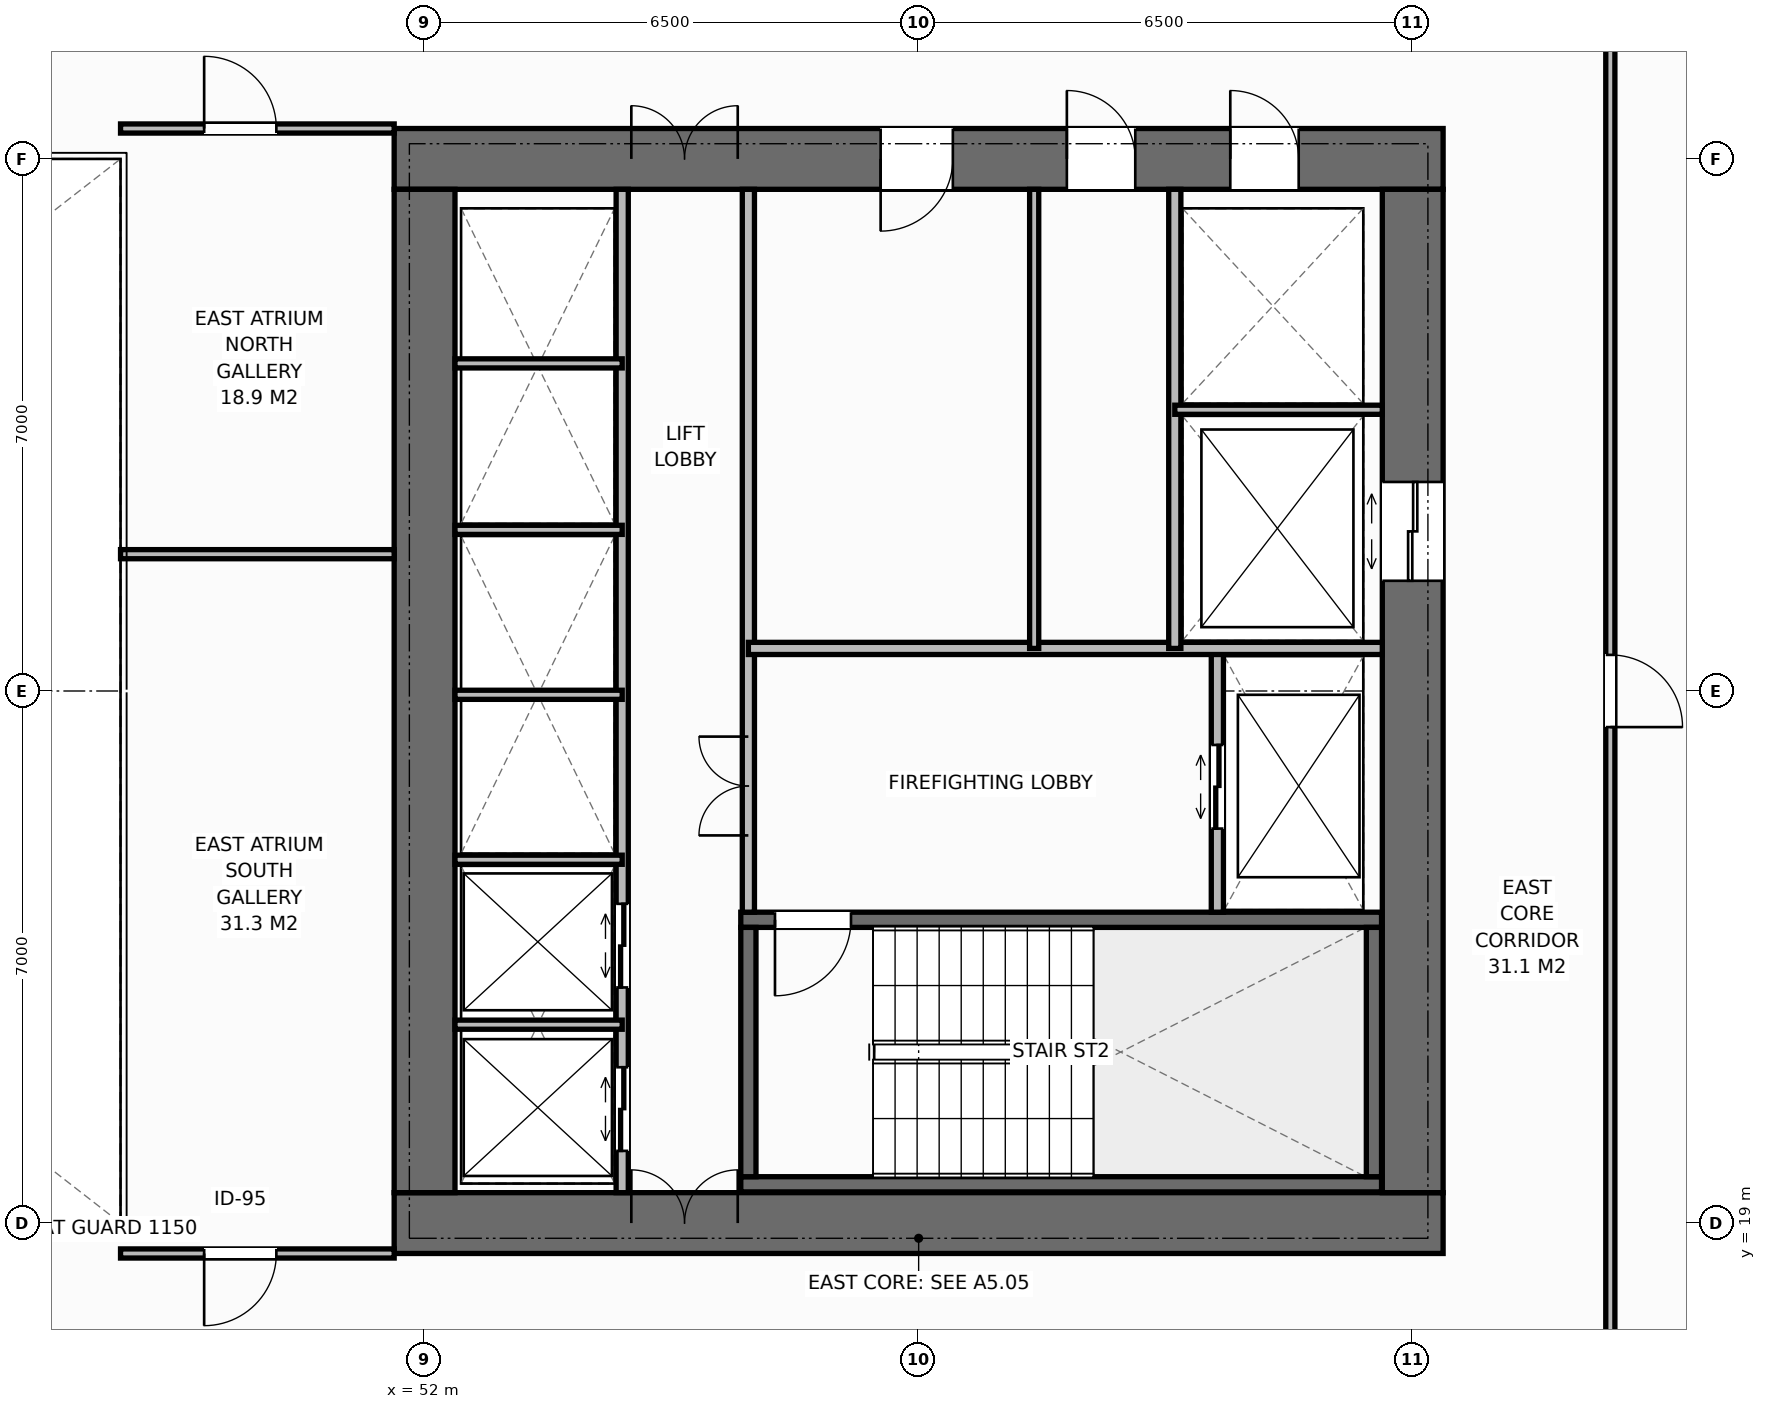
"""IFC4 building model, lengths in metres.
Left out: names, types, materials, properties, quantities, classifications, styles, units other than length and angle.
Written with IfcOpenShell. Run it as: python <this file> out.ifc"""

import sys

from ifc_helpers import new_model, si_unit, direction, frame, frame_2d, origin, place, context, subcontext, project, spatial, rectangle, extrude, element, fill, save


model = new_model("IFC4")
c1 = context("Model", 3, precision=1e-05, world=origin(), true_north=direction((0.0, 1.0)))
c2 = subcontext(c1, "Body", "Model", "MODEL_VIEW")
j1 = project(units=[si_unit("LENGTHUNIT", "METRE"), si_unit("PLANEANGLEUNIT", "RADIAN")], contexts=[c1])
p1 = place(None, origin())
s1 = spatial("IfcSite", under=j1, at=p1, CompositionType="ELEMENT")
p2 = place(p1, origin())
s2 = spatial("IfcBuilding", under=s1, at=p2, CompositionType="ELEMENT")
p3 = place(p2, frame((0.0, 0.0, 58.2)))
s3 = spatial("IfcBuildingStorey", under=s2, at=p3, CompositionType="ELEMENT", Elevation=58.2)
p4 = place(p3, frame((51.6, 19.0, 0.0), z_axis=(0.0, 0.0, 1.0), x_axis=(1.0, 0.0, 0.0)))
e1 = element("IfcWall", 1, at=p4, inside=s3, PredefinedType="SHEAR", context=c2, shape_type="SweptSolid", body=[
    extrude(rectangle(XDim=13.8, YDim=0.8, at=frame_2d((6.9, 0.0))), origin(), (0.0, 0.0, 1.0), 3.8),
])
p5 = place(p4, frame((3.12, 0.0, 0.0)))
e2 = element("IfcOpeningElement", 2, at=p5, cuts=e1, PredefinedType="OPENING", context=c2, shape_type="SweptSolid", body=[
    extrude(rectangle(XDim=1.4, YDim=2.2, at=frame_2d((0.7, 1.1))), frame((0.0, 0.41, 0.0), z_axis=(0.0, -1.0, 0.0), x_axis=(1.0, 0.0, 0.0)), (0.0, 0.0, 1.0), 0.82),
])
p6 = place(p3, frame((51.6, 33.0, 0.0), z_axis=(0.0, 0.0, 1.0), x_axis=(1.0, 0.0, 0.0)))
e3 = element("IfcWall", 3, at=p6, inside=s3, PredefinedType="SHEAR", context=c2, shape_type="SweptSolid", body=[
    extrude(rectangle(XDim=13.8, YDim=0.8, at=frame_2d((6.9, 0.0))), origin(), (0.0, 0.0, 1.0), 3.8),
])
p7 = place(p6, frame((3.12, 0.0, 0.0)))
e4 = element("IfcOpeningElement", 4, at=p7, cuts=e3, PredefinedType="OPENING", context=c2, shape_type="SweptSolid", body=[
    extrude(rectangle(XDim=1.4, YDim=2.2, at=frame_2d((0.7, 1.1))), frame((0.0, 0.41, 0.0), z_axis=(0.0, -1.0, 0.0), x_axis=(1.0, 0.0, 0.0)), (0.0, 0.0, 1.0), 0.82),
])
p8 = place(p6, frame((11.0, 0.0, 0.0)))
e5 = element("IfcOpeningElement", 5, at=p8, cuts=e3, PredefinedType="OPENING", context=c2, shape_type="SweptSolid", body=[
    extrude(rectangle(XDim=0.9, YDim=2.15, at=frame_2d((0.45, 1.075))), frame((0.0, 0.41, 0.0), z_axis=(0.0, -1.0, 0.0), x_axis=(1.0, 0.0, 0.0)), (0.0, 0.0, 1.0), 0.82),
])
p9 = place(p6, frame((6.4, 0.0, 0.0)))
e6 = element("IfcOpeningElement", 6, at=p9, cuts=e3, PredefinedType="OPENING", context=c2, shape_type="SweptSolid", body=[
    extrude(rectangle(XDim=0.95, YDim=2.15, at=frame_2d((0.475, 1.075))), frame((0.0, 0.41, 0.0), z_axis=(0.0, -1.0, 0.0), x_axis=(1.0, 0.0, 0.0)), (0.0, 0.0, 1.0), 0.82),
])
p10 = place(p6, frame((8.85, 0.0, 0.0)))
e7 = element("IfcOpeningElement", 7, at=p10, cuts=e3, PredefinedType="OPENING", context=c2, shape_type="SweptSolid", body=[
    extrude(rectangle(XDim=0.9, YDim=2.15, at=frame_2d((0.45, 1.075))), frame((0.0, 0.41, 0.0), z_axis=(0.0, -1.0, 0.0), x_axis=(1.0, 0.0, 0.0)), (0.0, 0.0, 1.0), 0.82),
])
p11 = place(p3, frame((52.0, 19.4, 0.0), z_axis=(0.0, 0.0, 1.0), x_axis=(0.0, 1.0, 0.0)))
e8 = element("IfcWall", 8, at=p11, inside=s3, PredefinedType="SHEAR", context=c2, shape_type="SweptSolid", body=[
    extrude(rectangle(XDim=13.2, YDim=0.8, at=frame_2d((6.6, 0.0))), origin(), (0.0, 0.0, 1.0), 3.8),
])
p12 = place(p3, frame((65.0, 19.4, 0.0), z_axis=(0.0, 0.0, 1.0), x_axis=(0.0, 1.0, 0.0)))
e9 = element("IfcWall", 9, at=p12, inside=s3, PredefinedType="SHEAR", context=c2, shape_type="SweptSolid", body=[
    extrude(rectangle(XDim=13.2, YDim=0.8, at=frame_2d((6.6, 0.0))), origin(), (0.0, 0.0, 1.0), 3.8),
])
p13 = place(p12, frame((8.05, 0.0, 0.0)))
e10 = element("IfcOpeningElement", 10, at=p13, cuts=e9, PredefinedType="OPENING", context=c2, shape_type="SweptSolid", body=[
    extrude(rectangle(XDim=1.3, YDim=2.2, at=frame_2d((0.65, 1.1))), frame((0.0, 0.41, 0.0), z_axis=(0.0, -1.0, 0.0), x_axis=(1.0, 0.0, 0.0)), (0.0, 0.0, 1.0), 0.82),
])
p14 = place(p3, frame((56.16, 19.51, 0.0), z_axis=(0.0, 0.0, 1.0), x_axis=(1.0, 0.0, 0.0)))
e11 = element("IfcWall", 11, at=p14, inside=s3, PredefinedType="SHEAR", context=c2, shape_type="SweptSolid", body=[
    extrude(rectangle(XDim=8.43, YDim=0.2, at=frame_2d((4.215, 0.0))), origin(), (0.0, 0.0, 1.0), 3.8),
])
p15 = place(p3, frame((56.16, 22.99, 0.0), z_axis=(0.0, 0.0, 1.0), x_axis=(1.0, 0.0, 0.0)))
e12 = element("IfcWall", 12, at=p15, inside=s3, PredefinedType="SHEAR", context=c2, shape_type="SweptSolid", body=[
    extrude(rectangle(XDim=8.43, YDim=0.2, at=frame_2d((4.215, 0.0))), origin(), (0.0, 0.0, 1.0), 3.8),
])
p16 = place(p15, frame((0.45, 0.0, 0.0)))
e13 = element("IfcOpeningElement", 13, at=p16, cuts=e12, PredefinedType="OPENING", context=c2, shape_type="SweptSolid", body=[
    extrude(rectangle(XDim=1.0, YDim=2.15, at=frame_2d((0.5, 1.075))), frame((0.0, 0.11, 0.0), z_axis=(0.0, -1.0, 0.0), x_axis=(1.0, 0.0, 0.0)), (0.0, 0.0, 1.0), 0.22),
])
for number, where, z_axis, x_axis in (
    (14, (56.26, 19.61, 0.0), (0.0, 0.0, 1.0), (0.0, 1.0, 0.0)),
    (15, (64.49, 19.61, 0.0), (0.0, 0.0, 1.0), (0.0, 1.0, 0.0)),
):
    element("IfcWall", number, at=place(p3, frame(where, z_axis=z_axis, x_axis=x_axis)), inside=s3, PredefinedType="SHEAR", context=c2, shape_type="SweptSolid", body=[
        extrude(rectangle(XDim=3.28, YDim=0.2, at=frame_2d((1.64, 0.0))), origin(), (0.0, 0.0, 1.0), 3.8),
    ])
p17 = place(p3, frame((54.6, 19.4, 0.0), z_axis=(0.0, 0.0, 1.0), x_axis=(0.0, 1.0, 0.0)))
e16 = element("IfcWall", 16, at=p17, inside=s3, PredefinedType="STANDARD", context=c2, shape_type="SweptSolid", body=[
    extrude(rectangle(XDim=13.2, YDim=0.16, at=frame_2d((6.6, 0.0))), origin(), (0.0, 0.0, 1.0), 3.55),
])
p18 = place(p17, frame((0.55, 0.0, 0.0)))
e17 = element("IfcOpeningElement", 17, at=p18, cuts=e16, PredefinedType="OPENING", context=c2, shape_type="SweptSolid", body=[
    extrude(rectangle(XDim=1.1, YDim=2.2, at=frame_2d((0.55, 1.1))), frame((0.0, 0.09, 0.0), z_axis=(0.0, -1.0, 0.0), x_axis=(1.0, 0.0, 0.0)), (0.0, 0.0, 1.0), 0.18),
])
p19 = place(p17, frame((2.7, 0.0, 0.0)))
e18 = element("IfcOpeningElement", 18, at=p19, cuts=e16, PredefinedType="OPENING", context=c2, shape_type="SweptSolid", body=[
    extrude(rectangle(XDim=1.1, YDim=2.2, at=frame_2d((0.55, 1.1))), frame((0.0, 0.09, 0.0), z_axis=(0.0, -1.0, 0.0), x_axis=(1.0, 0.0, 0.0)), (0.0, 0.0, 1.0), 0.18),
])
p20 = place(p3, frame((56.26, 23.09, 0.0), z_axis=(0.0, 0.0, 1.0), x_axis=(0.0, 1.0, 0.0)))
e19 = element("IfcWall", 19, at=p20, inside=s3, PredefinedType="STANDARD", context=c2, shape_type="SweptSolid", body=[
    extrude(rectangle(XDim=9.51, YDim=0.16, at=frame_2d((4.755, 0.0))), origin(), (0.0, 0.0, 1.0), 3.55),
])
p21 = place(p20, frame((1.01, 0.0, 0.0)))
e20 = element("IfcOpeningElement", 20, at=p21, cuts=e19, PredefinedType="OPENING", context=c2, shape_type="SweptSolid", body=[
    extrude(rectangle(XDim=1.3, YDim=2.2, at=frame_2d((0.65, 1.1))), frame((0.0, 0.09, 0.0), z_axis=(0.0, -1.0, 0.0), x_axis=(1.0, 0.0, 0.0)), (0.0, 0.0, 1.0), 0.18),
])
for number, where, z_axis, x_axis in (
    (21, (52.4, 21.61, 0.0), (0.0, 0.0, 1.0), (1.0, 0.0, 0.0)),
    (22, (52.4, 23.78, 0.0), (0.0, 0.0, 1.0), (1.0, 0.0, 0.0)),
    (23, (52.4, 25.95, 0.0), (0.0, 0.0, 1.0), (1.0, 0.0, 0.0)),
    (24, (52.4, 28.12, 0.0), (0.0, 0.0, 1.0), (1.0, 0.0, 0.0)),
    (25, (52.4, 30.31, 0.0), (0.0, 0.0, 1.0), (1.0, 0.0, 0.0)),
):
    element("IfcWall", number, at=place(p3, frame(where, z_axis=z_axis, x_axis=x_axis)), inside=s3, PredefinedType="PARTITIONING", context=c2, shape_type="SweptSolid", body=[
        extrude(rectangle(XDim=2.2, YDim=0.12, at=frame_2d((1.1, 0.0))), origin(), (0.0, 0.0, 1.0), 3.55),
    ])
p22 = place(p3, frame((62.43, 23.09, 0.0), z_axis=(0.0, 0.0, 1.0), x_axis=(0.0, 1.0, 0.0)))
e26 = element("IfcWall", 26, at=p22, inside=s3, PredefinedType="STANDARD", context=c2, shape_type="SweptSolid", body=[
    extrude(rectangle(XDim=3.47, YDim=0.16, at=frame_2d((1.735, 0.0))), origin(), (0.0, 0.0, 1.0), 3.55),
])
p23 = place(p22, frame((1.1, 0.0, 0.0)))
e27 = element("IfcOpeningElement", 27, at=p23, cuts=e26, PredefinedType="OPENING", context=c2, shape_type="SweptSolid", body=[
    extrude(rectangle(XDim=1.1, YDim=2.2, at=frame_2d((0.55, 1.1))), frame((0.0, 0.09, 0.0), z_axis=(0.0, -1.0, 0.0), x_axis=(1.0, 0.0, 0.0)), (0.0, 0.0, 1.0), 0.18),
])
p24 = place(p3, frame((56.26, 26.56, 0.0), z_axis=(0.0, 0.0, 1.0), x_axis=(1.0, 0.0, 0.0)))
e28 = element("IfcWall", 28, at=p24, inside=s3, PredefinedType="STANDARD", context=c2, shape_type="SweptSolid", body=[
    extrude(rectangle(XDim=8.34, YDim=0.16, at=frame_2d((4.17, 0.0))), origin(), (0.0, 0.0, 1.0), 3.55),
])
p25 = place(p3, frame((61.87, 26.56, 0.0), z_axis=(0.0, 0.0, 1.0), x_axis=(0.0, 1.0, 0.0)))
e29 = element("IfcWall", 29, at=p25, inside=s3, PredefinedType="STANDARD", context=c2, shape_type="SweptSolid", body=[
    extrude(rectangle(XDim=6.04, YDim=0.16, at=frame_2d((3.02, 0.0))), origin(), (0.0, 0.0, 1.0), 3.55),
])
p26 = place(p3, frame((61.87, 29.7, 0.0), z_axis=(0.0, 0.0, 1.0), x_axis=(1.0, 0.0, 0.0)))
e30 = element("IfcWall", 30, at=p26, inside=s3, PredefinedType="PARTITIONING", context=c2, shape_type="SweptSolid", body=[
    extrude(rectangle(XDim=2.73, YDim=0.12, at=frame_2d((1.365, 0.0))), origin(), (0.0, 0.0, 1.0), 3.55),
])
p27 = place(p3, frame((60.02, 26.56, 0.0), z_axis=(0.0, 0.0, 1.0), x_axis=(0.0, 1.0, 0.0)))
e31 = element("IfcWall", 31, at=p27, inside=s3, PredefinedType="PARTITIONING", context=c2, shape_type="SweptSolid", body=[
    extrude(rectangle(XDim=6.04, YDim=0.12, at=frame_2d((3.02, 0.0))), origin(), (0.0, 0.0, 1.0), 3.55),
])
p28 = place(p3, frame((48.0, 27.8, 0.0), z_axis=(0.0, 0.0, 1.0), x_axis=(1.0, 0.0, 0.0)))
e32 = element("IfcWall", 32, at=p28, inside=s3, PredefinedType="PARTITIONING", context=c2, shape_type="SweptSolid", body=[
    extrude(rectangle(XDim=3.6, YDim=0.12, at=frame_2d((1.8, 0.0))), origin(), (0.0, 0.0, 1.0), 3.55),
])
p29 = place(p3, frame((48.0, 18.6, 0.0), z_axis=(0.0, 0.0, 1.0), x_axis=(1.0, 0.0, 0.0)))
e33 = element("IfcWall", 33, at=p29, inside=s3, PredefinedType="PARTITIONING", context=c2, shape_type="SweptSolid", body=[
    extrude(rectangle(XDim=3.6, YDim=0.12, at=frame_2d((1.8, 0.0))), origin(), (0.0, 0.0, 1.0), 3.55),
])
p30 = place(p29, frame((1.1, 0.0, 0.0)))
e34 = element("IfcOpeningElement", 34, at=p30, cuts=e33, PredefinedType="OPENING", context=c2, shape_type="SweptSolid", body=[
    extrude(rectangle(XDim=0.95, YDim=2.15, at=frame_2d((0.475, 1.075))), frame((0.0, 0.07, 0.0), z_axis=(0.0, -1.0, 0.0), x_axis=(1.0, 0.0, 0.0)), (0.0, 0.0, 1.0), 0.14),
])
p31 = place(p3, frame((48.0, 33.4, 0.0), z_axis=(0.0, 0.0, 1.0), x_axis=(1.0, 0.0, 0.0)))
e35 = element("IfcWall", 35, at=p31, inside=s3, PredefinedType="PARTITIONING", context=c2, shape_type="SweptSolid", body=[
    extrude(rectangle(XDim=3.6, YDim=0.12, at=frame_2d((1.8, 0.0))), origin(), (0.0, 0.0, 1.0), 3.55),
])
p32 = place(p31, frame((1.1, 0.0, 0.0)))
e36 = element("IfcOpeningElement", 36, at=p32, cuts=e35, PredefinedType="OPENING", context=c2, shape_type="SweptSolid", body=[
    extrude(rectangle(XDim=0.95, YDim=2.15, at=frame_2d((0.475, 1.075))), frame((0.0, 0.07, 0.0), z_axis=(0.0, -1.0, 0.0), x_axis=(1.0, 0.0, 0.0)), (0.0, 0.0, 1.0), 0.14),
])
p33 = place(p3, frame((67.6, 16.5, 0.0), z_axis=(0.0, 0.0, 1.0), x_axis=(0.0, 1.0, 0.0)))
e37 = element("IfcWall", 37, at=p33, inside=s3, PredefinedType="PARTITIONING", context=c2, shape_type="SweptSolid", body=[
    extrude(rectangle(XDim=19.0, YDim=0.12, at=frame_2d((9.5, 0.0))), origin(), (0.0, 0.0, 1.0), 3.55),
])
p34 = place(p33, frame((9.025, 0.0, 0.0)))
e38 = element("IfcOpeningElement", 38, at=p34, cuts=e37, PredefinedType="OPENING", context=c2, shape_type="SweptSolid", body=[
    extrude(rectangle(XDim=0.95, YDim=2.15, at=frame_2d((0.475, 1.075))), frame((0.0, 0.07, 0.0), z_axis=(0.0, -1.0, 0.0), x_axis=(1.0, 0.0, 0.0)), (0.0, 0.0, 1.0), 0.14),
])
p35 = place(p5, origin())
e39 = element("IfcDoor", 39, at=p35, inside=s3, OperationType="DOUBLE_DOOR_SINGLE_SWING", PredefinedType="DOOR", context=c2, shape_type="SweptSolid", body=[
    extrude(rectangle(XDim=1.4, YDim=2.2, at=frame_2d((0.7, 1.1))), frame((0.0, 0.125, 0.0), z_axis=(0.0, -1.0, 0.0), x_axis=(1.0, 0.0, 0.0)), (0.0, 0.0, 1.0), 0.05),
])
fill(e2, e39)
p36 = place(p7, origin())
e40 = element("IfcDoor", 40, at=p36, inside=s3, OperationType="DOUBLE_DOOR_SINGLE_SWING", PredefinedType="DOOR", context=c2, shape_type="SweptSolid", body=[
    extrude(rectangle(XDim=1.4, YDim=2.2, at=frame_2d((0.7, 1.1))), frame((0.0, -0.075, 0.0), z_axis=(0.0, -1.0, 0.0), x_axis=(1.0, 0.0, 0.0)), (0.0, 0.0, 1.0), 0.05),
])
fill(e4, e40)
p37 = place(p18, origin())
e41 = element("IfcDoor", 41, at=p37, inside=s3, OperationType="DOUBLE_DOOR_SLIDING", PredefinedType="DOOR", context=c2, shape_type="SweptSolid", body=[
    extrude(rectangle(XDim=1.1, YDim=2.2, at=frame_2d((0.55, 1.1))), frame((0.0, 0.025, 0.0), z_axis=(0.0, -1.0, 0.0), x_axis=(1.0, 0.0, 0.0)), (0.0, 0.0, 1.0), 0.05),
])
fill(e17, e41)
p38 = place(p19, origin())
e42 = element("IfcDoor", 42, at=p38, inside=s3, OperationType="DOUBLE_DOOR_SLIDING", PredefinedType="DOOR", context=c2, shape_type="SweptSolid", body=[
    extrude(rectangle(XDim=1.1, YDim=2.2, at=frame_2d((0.55, 1.1))), frame((0.0, 0.025, 0.0), z_axis=(0.0, -1.0, 0.0), x_axis=(1.0, 0.0, 0.0)), (0.0, 0.0, 1.0), 0.05),
])
fill(e18, e42)
p39 = place(p16, origin())
e43 = element("IfcDoor", 43, at=p39, inside=s3, OperationType="SINGLE_SWING_RIGHT", PredefinedType="DOOR", context=c2, shape_type="SweptSolid", body=[
    extrude(rectangle(XDim=1.0, YDim=2.15, at=frame_2d((0.5, 1.075))), frame((0.0, 0.025, 0.0), z_axis=(0.0, -1.0, 0.0), x_axis=(1.0, 0.0, 0.0)), (0.0, 0.0, 1.0), 0.05),
])
fill(e13, e43)
p40 = place(p23, origin())
e44 = element("IfcDoor", 44, at=p40, inside=s3, OperationType="DOUBLE_DOOR_SLIDING", PredefinedType="DOOR", context=c2, shape_type="SweptSolid", body=[
    extrude(rectangle(XDim=1.1, YDim=2.2, at=frame_2d((0.55, 1.1))), frame((0.0, 0.025, 0.0), z_axis=(0.0, -1.0, 0.0), x_axis=(1.0, 0.0, 0.0)), (0.0, 0.0, 1.0), 0.05),
])
fill(e27, e44)
p41 = place(p21, origin())
e45 = element("IfcDoor", 45, at=p41, inside=s3, OperationType="DOUBLE_DOOR_SINGLE_SWING", PredefinedType="DOOR", context=c2, shape_type="SweptSolid", body=[
    extrude(rectangle(XDim=1.3, YDim=2.2, at=frame_2d((0.65, 1.1))), frame((0.0, 0.025, 0.0), z_axis=(0.0, -1.0, 0.0), x_axis=(1.0, 0.0, 0.0)), (0.0, 0.0, 1.0), 0.05),
])
fill(e20, e45)
p42 = place(p13, origin())
e46 = element("IfcDoor", 46, at=p42, inside=s3, OperationType="DOUBLE_DOOR_SLIDING", PredefinedType="DOOR", context=c2, shape_type="SweptSolid", body=[
    extrude(rectangle(XDim=1.3, YDim=2.2, at=frame_2d((0.65, 1.1))), frame((0.0, 0.025, 0.0), z_axis=(0.0, -1.0, 0.0), x_axis=(1.0, 0.0, 0.0)), (0.0, 0.0, 1.0), 0.05),
])
fill(e10, e46)
p43 = place(p8, origin())
e47 = element("IfcDoor", 47, at=p43, inside=s3, OperationType="SINGLE_SWING_LEFT", PredefinedType="DOOR", context=c2, shape_type="SweptSolid", body=[
    extrude(rectangle(XDim=0.9, YDim=2.15, at=frame_2d((0.45, 1.075))), frame((0.0, -0.075, 0.0), z_axis=(0.0, -1.0, 0.0), x_axis=(1.0, 0.0, 0.0)), (0.0, 0.0, 1.0), 0.05),
])
fill(e5, e47)
p44 = place(p9, origin())
e48 = element("IfcDoor", 48, at=p44, inside=s3, OperationType="SINGLE_SWING_RIGHT", PredefinedType="DOOR", context=c2, shape_type="SweptSolid", body=[
    extrude(rectangle(XDim=0.95, YDim=2.15, at=frame_2d((0.475, 1.075))), frame((0.0, -0.075, 0.0), z_axis=(0.0, -1.0, 0.0), x_axis=(1.0, 0.0, 0.0)), (0.0, 0.0, 1.0), 0.05),
])
fill(e6, e48)
p45 = place(p10, origin())
e49 = element("IfcDoor", 49, at=p45, inside=s3, OperationType="SINGLE_SWING_LEFT", PredefinedType="DOOR", context=c2, shape_type="SweptSolid", body=[
    extrude(rectangle(XDim=0.9, YDim=2.15, at=frame_2d((0.45, 1.075))), frame((0.0, -0.075, 0.0), z_axis=(0.0, -1.0, 0.0), x_axis=(1.0, 0.0, 0.0)), (0.0, 0.0, 1.0), 0.05),
])
fill(e7, e49)
p46 = place(p30, origin())
e50 = element("IfcDoor", 50, at=p46, inside=s3, OperationType="SINGLE_SWING_RIGHT", PredefinedType="DOOR", context=c2, shape_type="SweptSolid", body=[
    extrude(rectangle(XDim=0.95, YDim=2.15, at=frame_2d((0.475, 1.075))), frame((0.0, 0.025, 0.0), z_axis=(0.0, -1.0, 0.0), x_axis=(1.0, 0.0, 0.0)), (0.0, 0.0, 1.0), 0.05),
])
fill(e34, e50)
p47 = place(p32, origin())
e51 = element("IfcDoor", 51, at=p47, inside=s3, OperationType="SINGLE_SWING_LEFT", PredefinedType="DOOR", context=c2, shape_type="SweptSolid", body=[
    extrude(rectangle(XDim=0.95, YDim=2.15, at=frame_2d((0.475, 1.075))), frame((0.0, 0.025, 0.0), z_axis=(0.0, -1.0, 0.0), x_axis=(1.0, 0.0, 0.0)), (0.0, 0.0, 1.0), 0.05),
])
fill(e36, e51)
p48 = place(p34, origin())
e52 = element("IfcDoor", 52, at=p48, inside=s3, OperationType="SINGLE_SWING_RIGHT", PredefinedType="DOOR", context=c2, shape_type="SweptSolid", body=[
    extrude(rectangle(XDim=0.95, YDim=2.15, at=frame_2d((0.475, 1.075))), frame((0.0, 0.025, 0.0), z_axis=(0.0, -1.0, 0.0), x_axis=(1.0, 0.0, 0.0)), (0.0, 0.0, 1.0), 0.05),
])
fill(e38, e52)
save(model, sys.argv[1])
